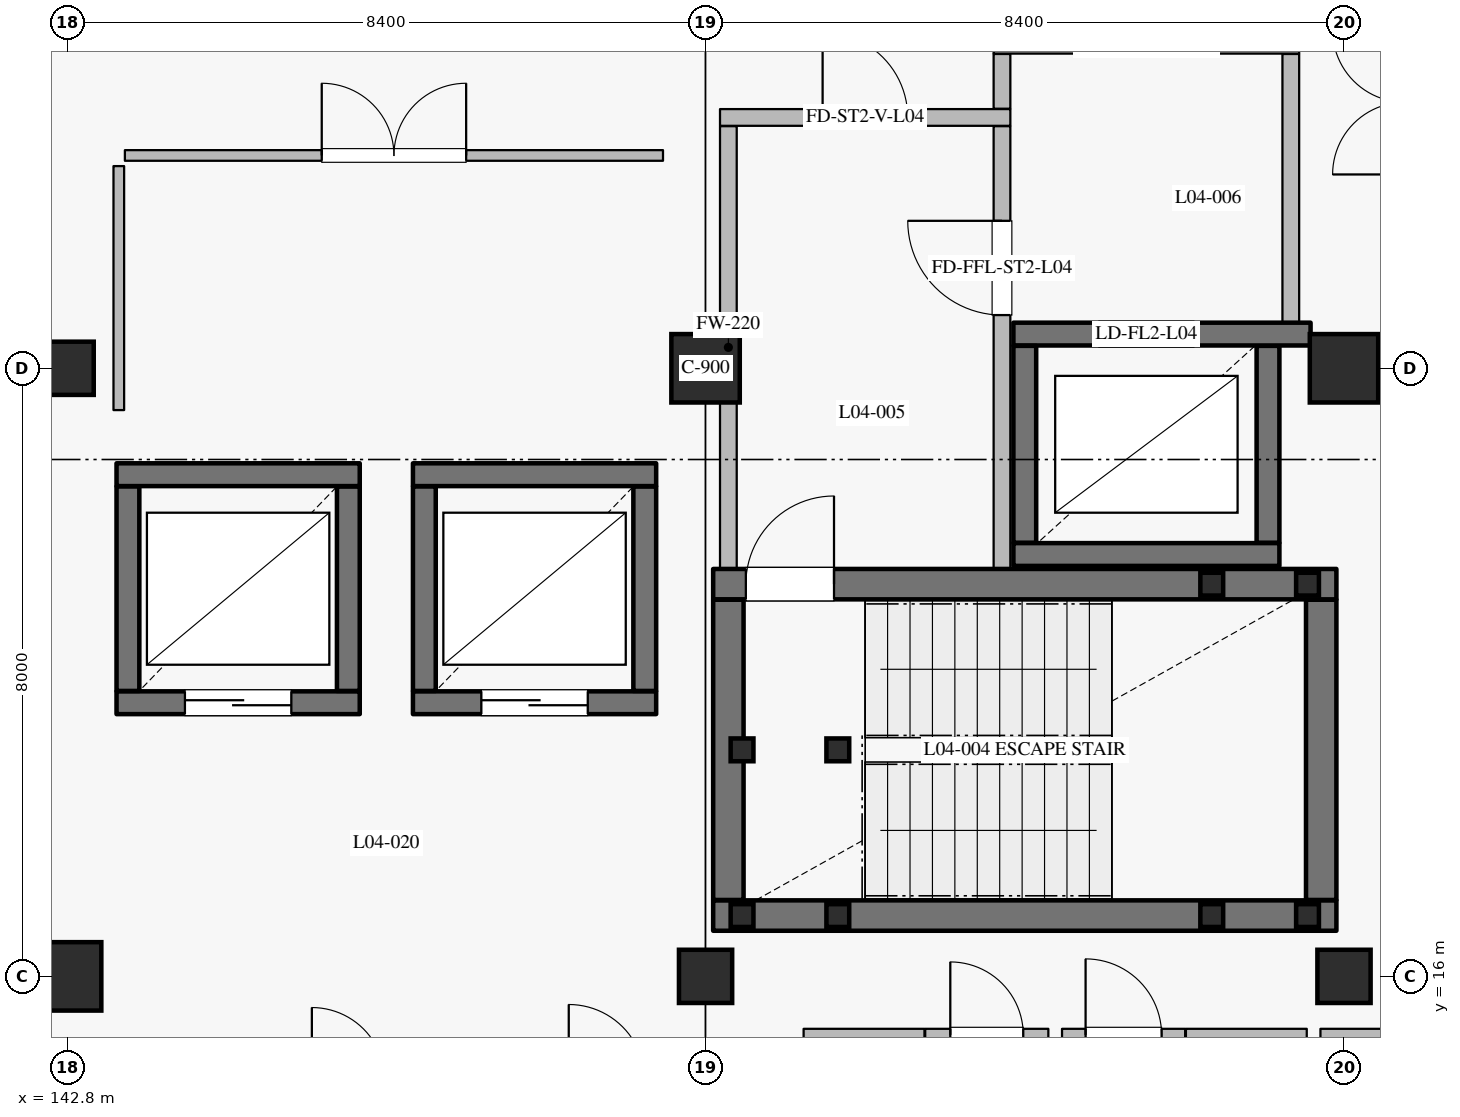
"""IFC4 building model, lengths in metres.
Left out: names, types, materials, properties, quantities, classifications, styles, units other than length and angle.
Written with IfcOpenShell. Run it as: python <this file> out.ifc"""

import sys

from ifc_helpers import new_model, si_unit, direction, frame, frame_2d, origin, origin_2d, place, context, subcontext, project, spatial, rectangle, hollow_rectangle, extrude, element, fill, save


model = new_model("IFC4")
c1 = context("Model", 3, precision=1e-05, world=origin(), true_north=direction((0.0, 1.0)))
c2 = subcontext(c1, "Body", "Model", "MODEL_VIEW")
j1 = project(units=[si_unit("LENGTHUNIT", "METRE"), si_unit("PLANEANGLEUNIT", "RADIAN")], contexts=[c1])
p1 = place(None, origin())
s1 = spatial("IfcSite", under=j1, at=p1, CompositionType="ELEMENT")
p2 = place(p1, origin())
s2 = spatial("IfcBuilding", under=s1, at=p2, CompositionType="ELEMENT")
p3 = place(p2, frame((0.0, 0.0, 21.0)))
s3 = spatial("IfcBuildingStorey", under=s2, at=p3, CompositionType="ELEMENT", Elevation=21.0)
for number, where, z_axis, x_axis in (
    (1, (142.8, 16.0, 0.0), (0.0, 0.0, 1.0), (1.0, 0.0, 0.0)),
    (2, (151.2, 24.0, 0.0), (0.0, 0.0, 1.0), (1.0, 0.0, 0.0)),
    (3, (159.6, 24.0, 0.0), (0.0, 0.0, 1.0), (1.0, 0.0, 0.0)),
):
    element("IfcColumn", number, at=place(p3, frame(where, z_axis=z_axis, x_axis=x_axis)), inside=s3, PredefinedType="COLUMN", context=c2, shape_type="SweptSolid", body=[
        extrude(rectangle(XDim=0.9, YDim=0.9, at=origin_2d()), origin(), (0.0, 0.0, 1.0), 4.2),
    ])
for number, where, z_axis, x_axis in (
    (4, (142.8, 24.0, 0.0), (0.0, 0.0, 1.0), (1.0, 0.0, 0.0)),
    (5, (151.2, 16.0, 0.0), (0.0, 0.0, 1.0), (1.0, 0.0, 0.0)),
    (6, (159.6, 16.0, 0.0), (0.0, 0.0, 1.0), (1.0, 0.0, 0.0)),
):
    element("IfcColumn", number, at=place(p3, frame(where, z_axis=z_axis, x_axis=x_axis)), inside=s3, PredefinedType="COLUMN", context=c2, shape_type="SweptSolid", body=[
        extrude(rectangle(XDim=0.7, YDim=0.7, at=origin_2d()), origin(), (0.0, 0.0, 1.0), 4.2),
    ])
p4 = place(p3, frame((167.6, 15.619, 0.0), z_axis=(0.0, 0.0, 1.0), x_axis=(-0.724156739794, -0.689635422677, 0.0)))
e7 = element("IfcWall", 7, at=p4, inside=s3, PredefinedType="SOLIDWALL", context=c2, shape_type="SweptSolid", body=[
    extrude(rectangle(XDim=10.495, YDim=0.24, at=frame_2d((5.248, 0.0))), origin(), (0.0, 0.0, 1.0), 3.53),
])
p5 = place(p4, frame((0.286, 0.0, 0.0)))
e8 = element("IfcOpeningElement", 8, at=p5, cuts=e7, PredefinedType="OPENING", context=c2, shape_type="SweptSolid", body=[
    extrude(rectangle(XDim=1.5, YDim=2.25, at=frame_2d((0.75, 1.125))), frame((0.0, 0.13, 0.0), z_axis=(0.0, -1.0, 0.0), x_axis=(1.0, 0.0, 0.0)), (0.0, 0.0, 1.0), 0.26),
])
p6 = place(p4, frame((3.757, 0.0, 0.8)))
e9 = element("IfcOpeningElement", 9, at=p6, cuts=e7, PredefinedType="OPENING", context=c2, shape_type="SweptSolid", body=[
    extrude(rectangle(XDim=1.6, YDim=1.6, at=frame_2d((0.8, 0.8))), frame((0.0, 0.13, 0.0), z_axis=(0.0, -1.0, 0.0), x_axis=(1.0, 0.0, 0.0)), (0.0, 0.0, 1.0), 0.26),
])
p7 = place(p4, frame((7.969, 0.0, 0.8)))
e10 = element("IfcOpeningElement", 10, at=p7, cuts=e7, PredefinedType="OPENING", context=c2, shape_type="SweptSolid", body=[
    extrude(rectangle(XDim=1.6, YDim=1.6, at=frame_2d((0.8, 0.8))), frame((0.0, 0.13, 0.0), z_axis=(0.0, -1.0, 0.0), x_axis=(1.0, 0.0, 0.0)), (0.0, 0.0, 1.0), 0.26),
])
p8 = place(p3, frame((155.25, 21.55, 0.0), z_axis=(0.0, 0.0, 1.0), x_axis=(1.0, 0.0, 0.0)))
e11 = element("IfcWall", 11, at=p8, inside=s3, PredefinedType="SHEAR", context=c2, shape_type="SweptSolid", body=[
    extrude(rectangle(XDim=3.5, YDim=0.3, at=frame_2d((1.75, 0.0))), origin(), (0.0, 0.0, 1.0), 3.965),
])
p9 = place(p3, frame((158.6, 21.705, 0.0), z_axis=(0.0, 0.0, 1.0), x_axis=(0.0, 1.0, 0.0)))
e12 = element("IfcWall", 12, at=p9, inside=s3, PredefinedType="SHEAR", context=c2, shape_type="SweptSolid", body=[
    extrude(rectangle(XDim=2.59, YDim=0.3, at=frame_2d((1.295, 0.0))), origin(), (0.0, 0.0, 1.0), 3.965),
])
p10 = place(p3, frame((159.16, 24.45, 0.0), z_axis=(0.0, 0.0, 1.0), x_axis=(-1.0, 0.0, 0.0)))
e13 = element("IfcWall", 13, at=p10, inside=s3, PredefinedType="SHEAR", context=c2, shape_type="SweptSolid", body=[
    extrude(rectangle(XDim=3.91, YDim=0.3, at=frame_2d((1.955, 0.0))), origin(), (0.0, 0.0, 1.0), 3.965),
])
p11 = place(p10, frame((1.535, 0.0, 0.0)))
e14 = element("IfcOpeningElement", 14, at=p11, cuts=e13, PredefinedType="OPENING", context=c2, shape_type="SweptSolid", body=[
    extrude(rectangle(XDim=1.25, YDim=2.25, at=frame_2d((0.625, 1.125))), frame((0.0, 0.16, 0.0), z_axis=(0.0, -1.0, 0.0), x_axis=(1.0, 0.0, 0.0)), (0.0, 0.0, 1.0), 0.32),
])
p12 = place(p3, frame((155.4, 24.295, 0.0), z_axis=(0.0, 0.0, 1.0), x_axis=(0.0, -1.0, 0.0)))
e15 = element("IfcWall", 15, at=p12, inside=s3, PredefinedType="SHEAR", context=c2, shape_type="SweptSolid", body=[
    extrude(rectangle(XDim=2.59, YDim=0.3, at=frame_2d((1.295, 0.0))), origin(), (0.0, 0.0, 1.0), 3.965),
])
p13 = place(p3, frame((143.45, 19.6, 0.0), z_axis=(0.0, 0.0, 1.0), x_axis=(1.0, 0.0, 0.0)))
e16 = element("IfcWall", 16, at=p13, inside=s3, PredefinedType="SHEAR", context=c2, shape_type="SweptSolid", body=[
    extrude(rectangle(XDim=3.2, YDim=0.3, at=frame_2d((1.6, 0.0))), origin(), (0.0, 0.0, 1.0), 3.965),
])
p14 = place(p13, frame((0.9, 0.0, 0.0)))
e17 = element("IfcOpeningElement", 17, at=p14, cuts=e16, PredefinedType="OPENING", context=c2, shape_type="SweptSolid", body=[
    extrude(rectangle(XDim=1.4, YDim=2.35, at=frame_2d((0.7, 1.175))), frame((0.0, 0.16, 0.0), z_axis=(0.0, -1.0, 0.0), x_axis=(1.0, 0.0, 0.0)), (0.0, 0.0, 1.0), 0.32),
])
p15 = place(p3, frame((146.5, 19.755, 0.0), z_axis=(0.0, 0.0, 1.0), x_axis=(0.0, 1.0, 0.0)))
e18 = element("IfcWall", 18, at=p15, inside=s3, PredefinedType="SHEAR", context=c2, shape_type="SweptSolid", body=[
    extrude(rectangle(XDim=2.69, YDim=0.3, at=frame_2d((1.345, 0.0))), origin(), (0.0, 0.0, 1.0), 3.965),
])
p16 = place(p3, frame((146.65, 22.6, 0.0), z_axis=(0.0, 0.0, 1.0), x_axis=(-1.0, 0.0, 0.0)))
e19 = element("IfcWall", 19, at=p16, inside=s3, PredefinedType="SHEAR", context=c2, shape_type="SweptSolid", body=[
    extrude(rectangle(XDim=3.2, YDim=0.3, at=frame_2d((1.6, 0.0))), origin(), (0.0, 0.0, 1.0), 3.965),
])
p17 = place(p3, frame((143.6, 22.445, 0.0), z_axis=(0.0, 0.0, 1.0), x_axis=(0.0, -1.0, 0.0)))
e20 = element("IfcWall", 20, at=p17, inside=s3, PredefinedType="SHEAR", context=c2, shape_type="SweptSolid", body=[
    extrude(rectangle(XDim=2.69, YDim=0.3, at=frame_2d((1.345, 0.0))), origin(), (0.0, 0.0, 1.0), 3.965),
])
p18 = place(p3, frame((147.35, 19.6, 0.0), z_axis=(0.0, 0.0, 1.0), x_axis=(1.0, 0.0, 0.0)))
e21 = element("IfcWall", 21, at=p18, inside=s3, PredefinedType="SHEAR", context=c2, shape_type="SweptSolid", body=[
    extrude(rectangle(XDim=3.2, YDim=0.3, at=frame_2d((1.6, 0.0))), origin(), (0.0, 0.0, 1.0), 3.965),
])
p19 = place(p18, frame((0.9, 0.0, 0.0)))
e22 = element("IfcOpeningElement", 22, at=p19, cuts=e21, PredefinedType="OPENING", context=c2, shape_type="SweptSolid", body=[
    extrude(rectangle(XDim=1.4, YDim=2.35, at=frame_2d((0.7, 1.175))), frame((0.0, 0.16, 0.0), z_axis=(0.0, -1.0, 0.0), x_axis=(1.0, 0.0, 0.0)), (0.0, 0.0, 1.0), 0.32),
])
p20 = place(p3, frame((150.4, 19.755, 0.0), z_axis=(0.0, 0.0, 1.0), x_axis=(0.0, 1.0, 0.0)))
e23 = element("IfcWall", 23, at=p20, inside=s3, PredefinedType="SHEAR", context=c2, shape_type="SweptSolid", body=[
    extrude(rectangle(XDim=2.69, YDim=0.3, at=frame_2d((1.345, 0.0))), origin(), (0.0, 0.0, 1.0), 3.965),
])
p21 = place(p3, frame((150.55, 22.6, 0.0), z_axis=(0.0, 0.0, 1.0), x_axis=(-1.0, 0.0, 0.0)))
e24 = element("IfcWall", 24, at=p21, inside=s3, PredefinedType="SHEAR", context=c2, shape_type="SweptSolid", body=[
    extrude(rectangle(XDim=3.2, YDim=0.3, at=frame_2d((1.6, 0.0))), origin(), (0.0, 0.0, 1.0), 3.965),
])
p22 = place(p3, frame((147.5, 22.445, 0.0), z_axis=(0.0, 0.0, 1.0), x_axis=(0.0, -1.0, 0.0)))
e25 = element("IfcWall", 25, at=p22, inside=s3, PredefinedType="SHEAR", context=c2, shape_type="SweptSolid", body=[
    extrude(rectangle(XDim=2.69, YDim=0.3, at=frame_2d((1.345, 0.0))), origin(), (0.0, 0.0, 1.0), 3.965),
])
p23 = place(p3, frame((151.3, 16.8, 0.0), z_axis=(0.0, 0.0, 1.0), x_axis=(1.0, 0.0, 0.0)))
e26 = element("IfcWall", 26, at=p23, inside=s3, PredefinedType="SHEAR", context=c2, shape_type="SweptSolid", body=[
    extrude(rectangle(XDim=8.2, YDim=0.4, at=frame_2d((4.1, 0.0))), origin(), (0.0, 0.0, 1.0), 3.965),
])
p24 = place(p3, frame((159.3, 17.005, 0.0), z_axis=(0.0, 0.0, 1.0), x_axis=(0.0, 1.0, 0.0)))
e27 = element("IfcWall", 27, at=p24, inside=s3, PredefinedType="SHEAR", context=c2, shape_type="SweptSolid", body=[
    extrude(rectangle(XDim=3.95, YDim=0.4, at=frame_2d((1.975, 0.0))), origin(), (0.0, 0.0, 1.0), 3.965),
])
p25 = place(p3, frame((151.3, 21.16, 0.0), z_axis=(0.0, 0.0, 1.0), x_axis=(1.0, 0.0, 0.0)))
e28 = element("IfcWall", 28, at=p25, inside=s3, PredefinedType="SHEAR", context=c2, shape_type="SweptSolid", body=[
    extrude(rectangle(XDim=8.2, YDim=0.4, at=frame_2d((4.1, 0.0))), origin(), (0.0, 0.0, 1.0), 3.965),
])
p26 = place(p25, frame((0.43, 0.0, 0.0)))
e29 = element("IfcOpeningElement", 29, at=p26, cuts=e28, PredefinedType="OPENING", context=c2, shape_type="SweptSolid", body=[
    extrude(rectangle(XDim=1.16, YDim=2.2, at=frame_2d((0.58, 1.1))), frame((0.0, 0.21, 0.0), z_axis=(0.0, -1.0, 0.0), x_axis=(1.0, 0.0, 0.0)), (0.0, 0.0, 1.0), 0.42),
])
p27 = place(p3, frame((151.5, 17.005, 0.0), z_axis=(0.0, 0.0, 1.0), x_axis=(0.0, 1.0, 0.0)))
e30 = element("IfcWall", 30, at=p27, inside=s3, PredefinedType="SHEAR", context=c2, shape_type="SweptSolid", body=[
    extrude(rectangle(XDim=3.95, YDim=0.4, at=frame_2d((1.975, 0.0))), origin(), (0.0, 0.0, 1.0), 3.965),
])
p28 = place(p3, frame((151.5, 21.365, 0.0), z_axis=(0.0, 0.0, 1.0), x_axis=(0.0, 1.0, 0.0)))
e31 = element("IfcWall", 31, at=p28, inside=s3, PredefinedType="PARTITIONING", context=c2, shape_type="SweptSolid", body=[
    extrude(rectangle(XDim=5.82, YDim=0.22, at=frame_2d((2.91, 0.0))), origin(), (0.0, 0.0, 1.0), 3.965),
])
p29 = place(p3, frame((151.39, 27.3, 0.0), z_axis=(0.0, 0.0, 1.0), x_axis=(1.0, 0.0, 0.0)))
e32 = element("IfcWall", 32, at=p29, inside=s3, PredefinedType="PARTITIONING", context=c2, shape_type="SweptSolid", body=[
    extrude(rectangle(XDim=3.82, YDim=0.22, at=frame_2d((1.91, 0.0))), origin(), (0.0, 0.0, 1.0), 3.965),
])
p30 = place(p29, frame((1.35, 0.0, 0.0)))
e33 = element("IfcOpeningElement", 33, at=p30, cuts=e32, PredefinedType="OPENING", context=c2, shape_type="SweptSolid", body=[
    extrude(rectangle(XDim=1.12, YDim=2.2, at=frame_2d((0.56, 1.1))), frame((0.0, 0.12, 0.0), z_axis=(0.0, -1.0, 0.0), x_axis=(1.0, 0.0, 0.0)), (0.0, 0.0, 1.0), 0.24),
])
p31 = place(p3, frame((155.1, 21.365, 0.0), z_axis=(0.0, 0.0, 1.0), x_axis=(0.0, 1.0, 0.0)))
e34 = element("IfcWall", 34, at=p31, inside=s3, PredefinedType="PARTITIONING", context=c2, shape_type="SweptSolid", body=[
    extrude(rectangle(XDim=5.82, YDim=0.22, at=frame_2d((2.91, 0.0))), origin(), (0.0, 0.0, 1.0), 3.965),
])
p32 = place(p31, frame((3.335, 0.0, 0.0)))
e35 = element("IfcOpeningElement", 35, at=p32, cuts=e34, PredefinedType="OPENING", context=c2, shape_type="SweptSolid", body=[
    extrude(rectangle(XDim=1.24, YDim=2.2, at=frame_2d((0.62, 1.1))), frame((0.0, 0.12, 0.0), z_axis=(0.0, -1.0, 0.0), x_axis=(1.0, 0.0, 0.0)), (0.0, 0.0, 1.0), 0.24),
])
p33 = place(p3, frame((155.1, 27.415, 0.0), z_axis=(0.0, 0.0, 1.0), x_axis=(0.0, 1.0, 0.0)))
e36 = element("IfcWall", 36, at=p33, inside=s3, PredefinedType="PARTITIONING", context=c2, shape_type="SweptSolid", body=[
    extrude(rectangle(XDim=0.72, YDim=0.22, at=frame_2d((0.36, 0.0))), origin(), (0.0, 0.0, 1.0), 3.965),
])
p34 = place(p3, frame((158.9, 24.605, 0.0), z_axis=(0.0, 0.0, 1.0), x_axis=(0.0, 1.0, 0.0)))
e37 = element("IfcWall", 37, at=p34, inside=s3, PredefinedType="PARTITIONING", context=c2, shape_type="SweptSolid", body=[
    extrude(rectangle(XDim=3.53, YDim=0.22, at=frame_2d((1.765, 0.0))), origin(), (0.0, 0.0, 1.0), 3.965),
])
p35 = place(p3, frame((154.99, 28.25, 0.0), z_axis=(0.0, 0.0, 1.0), x_axis=(1.0, 0.0, 0.0)))
e38 = element("IfcWall", 38, at=p35, inside=s3, PredefinedType="PARTITIONING", context=c2, shape_type="SweptSolid", body=[
    extrude(rectangle(XDim=4.02, YDim=0.22, at=frame_2d((2.01, 0.0))), origin(), (0.0, 0.0, 1.0), 3.965),
])
p36 = place(p35, frame((1.39, 0.0, 0.0)))
e39 = element("IfcOpeningElement", 39, at=p36, cuts=e38, PredefinedType="OPENING", context=c2, shape_type="SweptSolid", body=[
    extrude(rectangle(XDim=1.24, YDim=2.2, at=frame_2d((0.62, 1.1))), frame((0.0, 0.12, 0.0), z_axis=(0.0, -1.0, 0.0), x_axis=(1.0, 0.0, 0.0)), (0.0, 0.0, 1.0), 0.24),
])
for number, where, z_axis, x_axis in (
    (40, (151.68, 16.8, 0.0), (0.0, 0.0, 1.0), (1.0, 0.0, 0.0)),
    (41, (151.68, 18.98, 0.0), (0.0, 0.0, 1.0), (1.0, 0.0, 0.0)),
    (42, (152.94, 16.8, 0.0), (0.0, 0.0, 1.0), (1.0, 0.0, 0.0)),
    (43, (152.94, 18.98, 0.0), (0.0, 0.0, 1.0), (1.0, 0.0, 0.0)),
):
    element("IfcColumn", number, at=place(p3, frame(where, z_axis=z_axis, x_axis=x_axis)), inside=s3, PredefinedType="COLUMN", context=c2, shape_type="SweptSolid", body=[
        extrude(hollow_rectangle(XDim=0.3, YDim=0.3, WallThickness=0.012, at=origin_2d()), origin(), (0.0, 0.0, 1.0), 4.02),
    ])
for number, where, z_axis, x_axis in (
    (44, (157.86, 16.8, -2.4), (0.0, 0.0, 1.0), (1.0, 0.0, 0.0)),
    (45, (157.86, 21.16, -2.4), (0.0, 0.0, 1.0), (1.0, 0.0, 0.0)),
    (46, (159.12, 16.8, -2.4), (0.0, 0.0, 1.0), (1.0, 0.0, 0.0)),
    (47, (159.12, 21.16, -2.4), (0.0, 0.0, 1.0), (1.0, 0.0, 0.0)),
):
    element("IfcColumn", number, at=place(p3, frame(where, z_axis=z_axis, x_axis=x_axis)), inside=s3, PredefinedType="COLUMN", context=c2, shape_type="SweptSolid", body=[
        extrude(hollow_rectangle(XDim=0.3, YDim=0.3, WallThickness=0.012, at=origin_2d()), origin(), (0.0, 0.0, 1.0), 4.32),
    ])
p37 = place(p3, frame((152.49, 15.23, 0.0), z_axis=(0.0, 0.0, 1.0), x_axis=(1.0, 0.0, 0.0)))
e48 = element("IfcWall", 48, at=p37, inside=s3, PredefinedType="PARTITIONING", context=c2, shape_type="SweptSolid", body=[
    extrude(rectangle(XDim=1.59, YDim=0.16, at=frame_2d((0.795, 0.0))), origin(), (0.0, 0.0, 1.0), 3.965),
])
p38 = place(p3, frame((154.09, 15.23, 0.0), z_axis=(0.0, 0.0, 1.0), x_axis=(1.0, 0.0, 0.0)))
e49 = element("IfcWall", 49, at=p38, inside=s3, PredefinedType="PARTITIONING", context=c2, shape_type="SweptSolid", body=[
    extrude(rectangle(XDim=1.62, YDim=0.16, at=frame_2d((0.81, 0.0))), origin(), (0.0, 0.0, 1.0), 3.965),
])
p39 = place(p38, frame((0.33, 0.0, 0.0)))
e50 = element("IfcOpeningElement", 50, at=p39, cuts=e49, PredefinedType="OPENING", context=c2, shape_type="SweptSolid", body=[
    extrude(rectangle(XDim=0.96, YDim=2.2, at=frame_2d((0.48, 1.1))), frame((0.0, 0.09, 0.0), z_axis=(0.0, -1.0, 0.0), x_axis=(1.0, 0.0, 0.0)), (0.0, 0.0, 1.0), 0.18),
])
p40 = place(p3, frame((155.89, 15.23, 0.0), z_axis=(0.0, 0.0, 1.0), x_axis=(1.0, 0.0, 0.0)))
e51 = element("IfcWall", 51, at=p40, inside=s3, PredefinedType="PARTITIONING", context=c2, shape_type="SweptSolid", body=[
    extrude(rectangle(XDim=1.62, YDim=0.16, at=frame_2d((0.81, 0.0))), origin(), (0.0, 0.0, 1.0), 3.965),
])
p41 = place(p40, frame((0.31, 0.0, 0.0)))
e52 = element("IfcOpeningElement", 52, at=p41, cuts=e51, PredefinedType="OPENING", context=c2, shape_type="SweptSolid", body=[
    extrude(rectangle(XDim=1.0, YDim=2.25, at=frame_2d((0.5, 1.125))), frame((0.0, 0.09, 0.0), z_axis=(0.0, -1.0, 0.0), x_axis=(1.0, 0.0, 0.0)), (0.0, 0.0, 1.0), 0.18),
])
p42 = place(p3, frame((157.52, 15.23, 0.0), z_axis=(0.0, 0.0, 1.0), x_axis=(1.0, 0.0, 0.0)))
e53 = element("IfcWall", 53, at=p42, inside=s3, PredefinedType="PARTITIONING", context=c2, shape_type="SweptSolid", body=[
    extrude(rectangle(XDim=1.59, YDim=0.16, at=frame_2d((0.795, 0.0))), origin(), (0.0, 0.0, 1.0), 3.965),
])
p43 = place(p3, frame((159.29, 15.23, 0.0), z_axis=(0.0, 0.0, 1.0), x_axis=(1.0, 0.0, 0.0)))
e54 = element("IfcWall", 54, at=p43, inside=s3, PredefinedType="PARTITIONING", context=c2, shape_type="SweptSolid", body=[
    extrude(rectangle(XDim=1.59, YDim=0.16, at=frame_2d((0.795, 0.0))), origin(), (0.0, 0.0, 1.0), 3.965),
])
p44 = place(p3, frame((143.56, 26.8, 0.0), z_axis=(0.0, 0.0, 1.0), x_axis=(1.0, 0.0, 0.0)))
e55 = element("IfcWall", 55, at=p44, inside=s3, PredefinedType="PARTITIONING", context=c2, shape_type="SweptSolid", body=[
    extrude(rectangle(XDim=7.08, YDim=0.14, at=frame_2d((3.54, 0.0))), origin(), (0.0, 0.0, 1.0), 3.965),
])
p45 = place(p44, frame((2.59, 0.0, 0.0)))
e56 = element("IfcOpeningElement", 56, at=p45, cuts=e55, PredefinedType="OPENING", context=c2, shape_type="SweptSolid", body=[
    extrude(rectangle(XDim=1.9, YDim=2.4, at=frame_2d((0.95, 1.2))), frame((0.0, 0.08, 0.0), z_axis=(0.0, -1.0, 0.0), x_axis=(1.0, 0.0, 0.0)), (0.0, 0.0, 1.0), 0.16),
])
p46 = place(p3, frame((143.48, 23.45, 0.0), z_axis=(0.0, 0.0, 1.0), x_axis=(0.0, 1.0, 0.0)))
e57 = element("IfcWall", 57, at=p46, inside=s3, PredefinedType="PARTITIONING", context=c2, shape_type="SweptSolid", body=[
    extrude(rectangle(XDim=3.21, YDim=0.14, at=frame_2d((1.605, 0.0))), origin(), (0.0, 0.0, 1.0), 3.965),
])
p47 = place(p11, origin())
e58 = element("IfcDoor", 58, at=p47, inside=s3, OperationType="DOUBLE_DOOR_SLIDING", PredefinedType="DOOR", context=c2, shape_type="SweptSolid", body=[
    extrude(rectangle(XDim=1.25, YDim=2.25, at=frame_2d((0.625, 1.125))), frame((0.0, 0.025, 0.0), z_axis=(0.0, -1.0, 0.0), x_axis=(1.0, 0.0, 0.0)), (0.0, 0.0, 1.0), 0.05),
])
fill(e14, e58)
p48 = place(p14, origin())
e59 = element("IfcDoor", 59, at=p48, inside=s3, OperationType="DOUBLE_DOOR_SLIDING", PredefinedType="DOOR", context=c2, shape_type="SweptSolid", body=[
    extrude(rectangle(XDim=1.4, YDim=2.35, at=frame_2d((0.7, 1.175))), frame((0.0, 0.025, 0.0), z_axis=(0.0, -1.0, 0.0), x_axis=(1.0, 0.0, 0.0)), (0.0, 0.0, 1.0), 0.05),
])
fill(e17, e59)
p49 = place(p19, origin())
e60 = element("IfcDoor", 60, at=p49, inside=s3, OperationType="DOUBLE_DOOR_SLIDING", PredefinedType="DOOR", context=c2, shape_type="SweptSolid", body=[
    extrude(rectangle(XDim=1.4, YDim=2.35, at=frame_2d((0.7, 1.175))), frame((0.0, 0.025, 0.0), z_axis=(0.0, -1.0, 0.0), x_axis=(1.0, 0.0, 0.0)), (0.0, 0.0, 1.0), 0.05),
])
fill(e22, e60)
p50 = place(p26, origin())
e61 = element("IfcDoor", 61, at=p50, inside=s3, OperationType="SINGLE_SWING_RIGHT", PredefinedType="DOOR", context=c2, shape_type="SweptSolid", body=[
    extrude(rectangle(XDim=1.16, YDim=2.2, at=frame_2d((0.58, 1.1))), frame((0.0, 0.025, 0.0), z_axis=(0.0, -1.0, 0.0), x_axis=(1.0, 0.0, 0.0)), (0.0, 0.0, 1.0), 0.05),
])
fill(e29, e61)
p51 = place(p30, origin())
e62 = element("IfcDoor", 62, at=p51, inside=s3, OperationType="SINGLE_SWING_LEFT", PredefinedType="DOOR", context=c2, shape_type="SweptSolid", body=[
    extrude(rectangle(XDim=1.12, YDim=2.2, at=frame_2d((0.56, 1.1))), frame((0.0, 0.025, 0.0), z_axis=(0.0, -1.0, 0.0), x_axis=(1.0, 0.0, 0.0)), (0.0, 0.0, 1.0), 0.05),
])
fill(e33, e62)
p52 = place(p32, origin())
e63 = element("IfcDoor", 63, at=p52, inside=s3, OperationType="SINGLE_SWING_RIGHT", PredefinedType="DOOR", context=c2, shape_type="SweptSolid", body=[
    extrude(rectangle(XDim=1.24, YDim=2.2, at=frame_2d((0.62, 1.1))), frame((0.0, 0.025, 0.0), z_axis=(0.0, -1.0, 0.0), x_axis=(1.0, 0.0, 0.0)), (0.0, 0.0, 1.0), 0.05),
])
fill(e35, e63)
p53 = place(p39, origin())
e64 = element("IfcDoor", 64, at=p53, inside=s3, OperationType="SINGLE_SWING_LEFT", PredefinedType="DOOR", context=c2, shape_type="SweptSolid", body=[
    extrude(rectangle(XDim=0.96, YDim=2.2, at=frame_2d((0.48, 1.1))), frame((0.0, 0.025, 0.0), z_axis=(0.0, -1.0, 0.0), x_axis=(1.0, 0.0, 0.0)), (0.0, 0.0, 1.0), 0.05),
])
fill(e50, e64)
p54 = place(p41, origin())
e65 = element("IfcDoor", 65, at=p54, inside=s3, OperationType="SINGLE_SWING_LEFT", PredefinedType="DOOR", context=c2, shape_type="SweptSolid", body=[
    extrude(rectangle(XDim=1.0, YDim=2.25, at=frame_2d((0.5, 1.125))), frame((0.0, 0.025, 0.0), z_axis=(0.0, -1.0, 0.0), x_axis=(1.0, 0.0, 0.0)), (0.0, 0.0, 1.0), 0.05),
])
fill(e52, e65)
p55 = place(p45, origin())
e66 = element("IfcDoor", 66, at=p55, inside=s3, OperationType="DOUBLE_DOOR_SINGLE_SWING", PredefinedType="DOOR", context=c2, shape_type="SweptSolid", body=[
    extrude(rectangle(XDim=1.9, YDim=2.4, at=frame_2d((0.95, 1.2))), frame((0.0, 0.025, 0.0), z_axis=(0.0, -1.0, 0.0), x_axis=(1.0, 0.0, 0.0)), (0.0, 0.0, 1.0), 0.05),
])
fill(e56, e66)
save(model, sys.argv[1])
